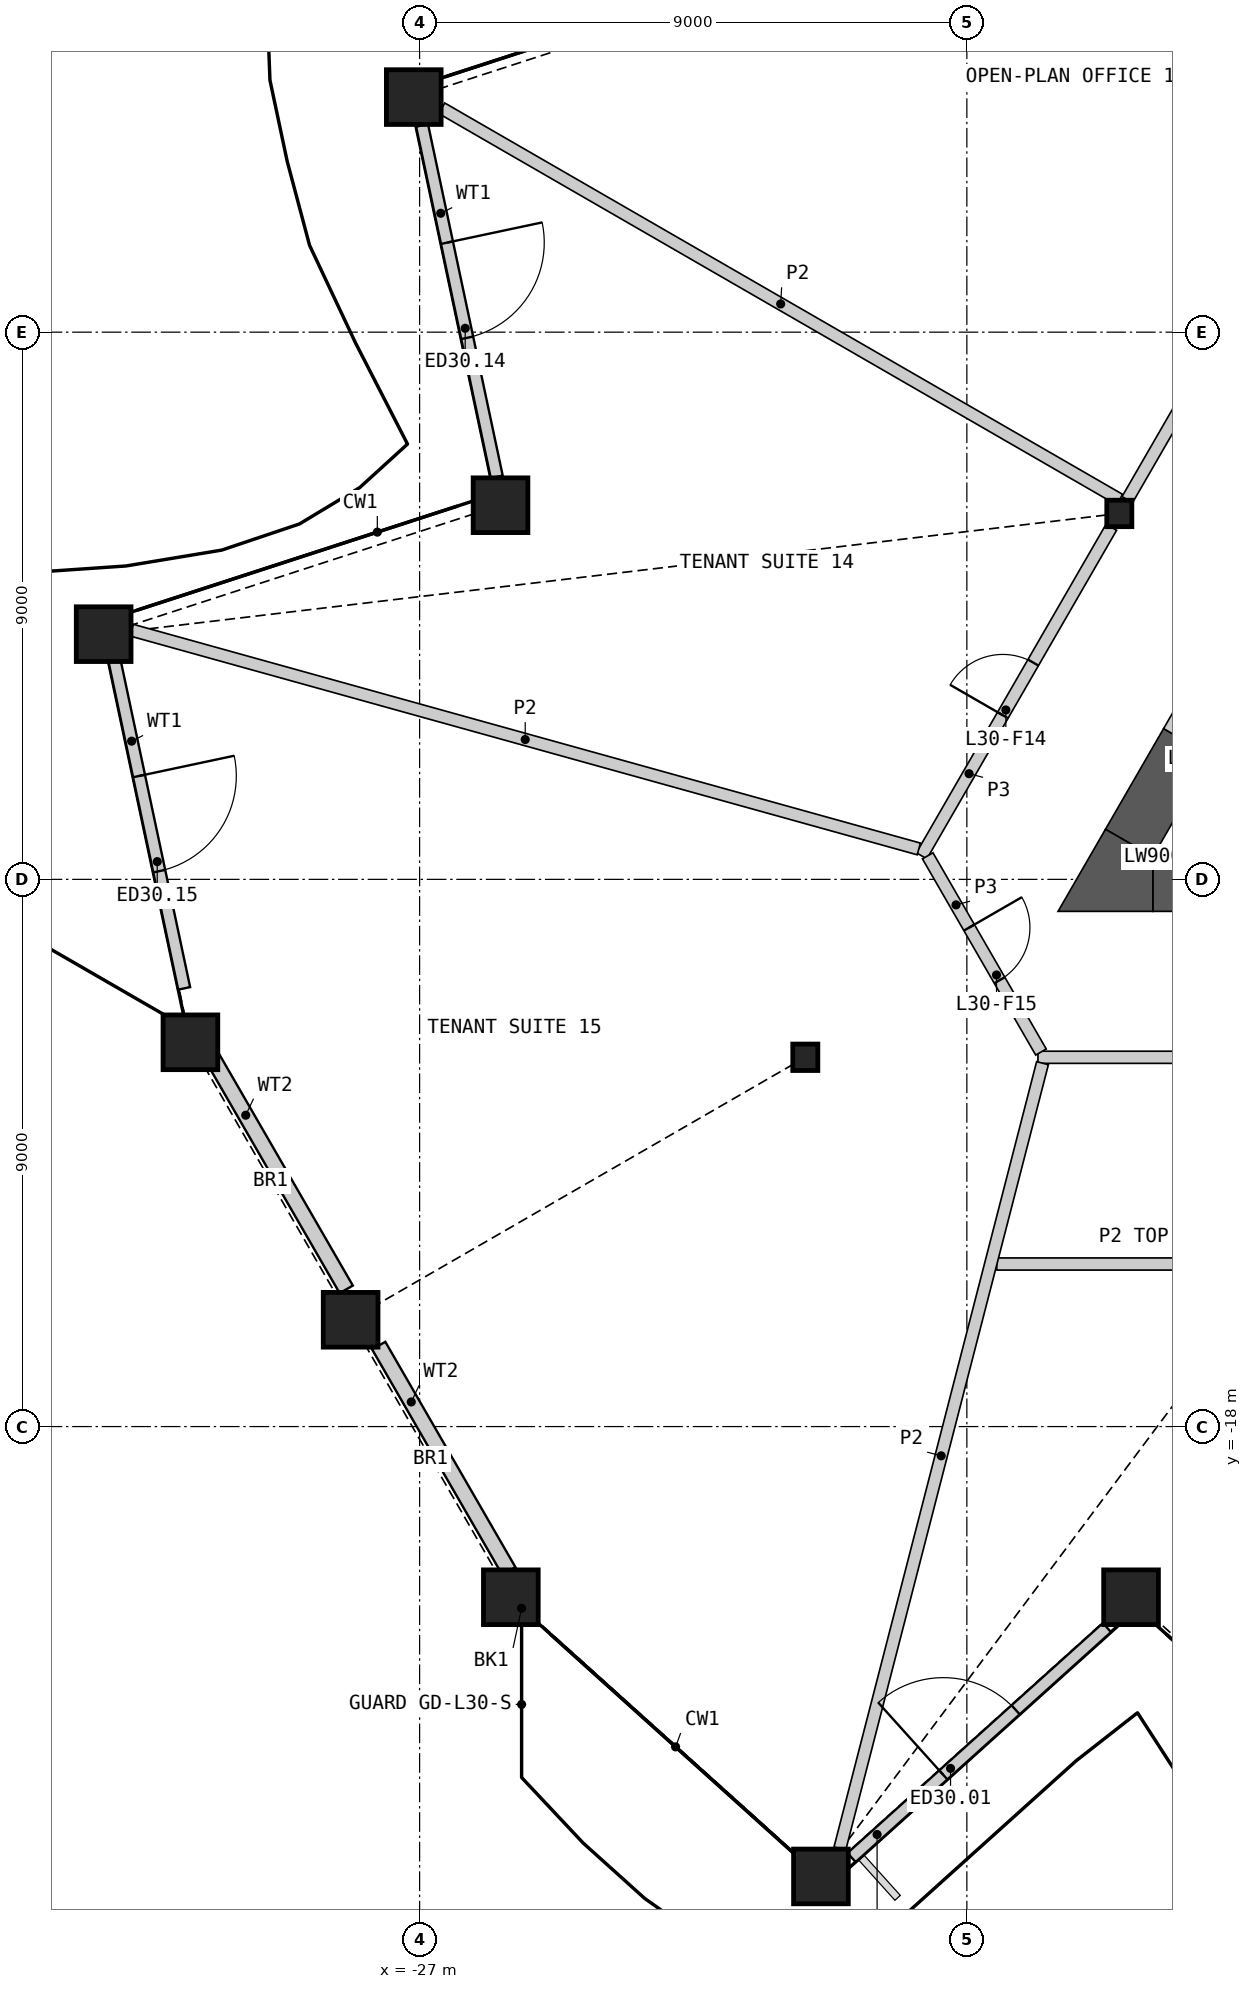
"""IFC4 building model, lengths in metres.
Left out: names, types, materials, properties, quantities, classifications, styles, units other than length and angle.
Written with IfcOpenShell. Run it as: python <this file> out.ifc"""

import sys

from ifc_helpers import new_model, si_unit, direction, frame, frame_2d, origin, origin_2d, place, context, subcontext, project, spatial, polyline, rectangle, hollow_rectangle, i_section, outline, extrude, element, fill, save


model = new_model("IFC4")
c1 = context("Model", 3, precision=1e-05, world=origin(), true_north=direction((0.0, 1.0)))
c2 = subcontext(c1, "Body", "Model", "MODEL_VIEW")
j1 = project(units=[si_unit("LENGTHUNIT", "METRE"), si_unit("PLANEANGLEUNIT", "RADIAN")], contexts=[c1])
p1 = place(None, origin())
s1 = spatial("IfcSite", under=j1, at=p1, CompositionType="ELEMENT")
p2 = place(p1, origin())
s2 = spatial("IfcBuilding", under=s1, at=p2, CompositionType="ELEMENT")
p3 = place(p2, frame((0.0, 0.0, 141.6)))
s3 = spatial("IfcBuildingStorey", under=s2, at=p3, CompositionType="ELEMENT", Elevation=141.6)
for number, where, z_axis, x_axis in (
    (1, (-25.5, -20.807, 0.0), (0.0, 0.0, 1.0), (1.0, 0.0, 0.0)),
    (2, (-20.4, -25.399, 0.0), (0.0, 0.0, 1.0), (1.0, 0.0, 0.0)),
    (3, (-15.3, -20.807, 0.0), (0.0, 0.0, 1.0), (1.0, 0.0, 0.0)),
    (4, (-27.096, 3.866, 0.0), (0.0, 0.0, 1.0), (1.0, 0.0, 0.0)),
    (5, (-25.669, -2.846, 0.0), (0.0, 0.0, 1.0), (1.0, 0.0, 0.0)),
    (6, (-32.196, -4.967, 0.0), (0.0, 0.0, 1.0), (1.0, 0.0, 0.0)),
    (7, (-30.769, -11.68, 0.0), (0.0, 0.0, 1.0), (1.0, 0.0, 0.0)),
    (8, (-28.135, -16.243, 0.0), (0.0, 0.0, 1.0), (1.0, 0.0, 0.0)),
):
    element("IfcColumn", number, at=place(p3, frame(where, z_axis=z_axis, x_axis=x_axis)), inside=s3, PredefinedType="COLUMN", context=c2, shape_type="SweptSolid", body=[
        extrude(hollow_rectangle(XDim=0.9, YDim=0.9, WallThickness=0.06, at=origin_2d()), origin(), (0.0, 0.0, 1.0), 4.2),
    ])
for number, where, z_axis, x_axis in (
    (9, (-15.493, -2.982, 0.0), (0.0, 0.0, 1.0), (1.0, 0.0, 0.0)),
    (10, (-20.657, -11.926, 0.0), (0.0, 0.0, 1.0), (1.0, 0.0, 0.0)),
):
    element("IfcColumn", number, at=place(p3, frame(where, z_axis=z_axis, x_axis=x_axis)), inside=s3, PredefinedType="COLUMN", context=c2, shape_type="SweptSolid", body=[
        extrude(i_section(OverallWidth=0.412, OverallDepth=0.435, WebThickness=0.036, FlangeThickness=0.057, at=origin_2d()), origin(), (0.0, 0.0, 1.0), 4.2),
    ])
p4 = place(p3, frame((-19.896, -25.088, 0.0), z_axis=(0.0, 0.0, 1.0), x_axis=(0.743158804828, 0.669115080391, 0.0)))
e11 = element("IfcWall", 11, at=p4, inside=s3, PredefinedType="SOLIDWALL", context=c2, shape_type="SweptSolid", body=[
    extrude(rectangle(XDim=5.651, YDim=0.2, at=frame_2d((2.826, 0.0))), origin(), (0.0, 0.0, 1.0), 3.189),
])
p5 = place(p4, frame((2.031, 0.0, 0.0)))
e12 = element("IfcOpeningElement", 12, at=p5, cuts=e11, PredefinedType="OPENING", context=c2, shape_type="SweptSolid", body=[
    extrude(rectangle(XDim=1.6, YDim=2.4, at=frame_2d((0.8, 1.2))), frame((0.0, 0.11, 0.0), z_axis=(0.0, -1.0, 0.0), x_axis=(1.0, 0.0, 0.0)), (0.0, 0.0, 1.0), 0.22),
])
p6 = place(p3, frame((-26.96, 3.401, 0.0), z_axis=(0.0, 0.0, 1.0), x_axis=(0.207883954519, -0.978153495855, 0.0)))
e13 = element("IfcWall", 13, at=p6, inside=s3, PredefinedType="SOLIDWALL", context=c2, shape_type="SweptSolid", body=[
    extrude(rectangle(XDim=5.91, YDim=0.2, at=frame_2d((2.955, 0.0))), origin(), (0.0, 0.0, 1.0), 3.189),
])
p7 = place(p6, frame((1.971, 0.0, 0.0)))
e14 = element("IfcOpeningElement", 14, at=p7, cuts=e13, PredefinedType="OPENING", context=c2, shape_type="SweptSolid", body=[
    extrude(rectangle(XDim=1.6, YDim=2.4, at=frame_2d((0.8, 1.2))), frame((0.0, 0.11, 0.0), z_axis=(0.0, -1.0, 0.0), x_axis=(1.0, 0.0, 0.0)), (0.0, 0.0, 1.0), 0.22),
])
p8 = place(p3, frame((-32.024, -5.371, 0.0), z_axis=(0.0, 0.0, 1.0), x_axis=(0.207934610169, -0.978142728795, 0.0)))
e15 = element("IfcWall", 15, at=p8, inside=s3, PredefinedType="SOLIDWALL", context=c2, shape_type="SweptSolid", body=[
    extrude(rectangle(XDim=5.543, YDim=0.2, at=frame_2d((2.771, 0.0))), origin(), (0.0, 0.0, 1.0), 3.189),
])
p9 = place(p8, frame((1.971, 0.0, 0.0)))
e16 = element("IfcOpeningElement", 16, at=p9, cuts=e15, PredefinedType="OPENING", context=c2, shape_type="SweptSolid", body=[
    extrude(rectangle(XDim=1.6, YDim=2.4, at=frame_2d((0.8, 1.2))), frame((0.0, 0.11, 0.0), z_axis=(0.0, -1.0, 0.0), x_axis=(1.0, 0.0, 0.0)), (0.0, 0.0, 1.0), 0.22),
])
p10 = place(p3, frame((-30.411, -11.924, 0.0), z_axis=(0.0, 0.0, 1.0), x_axis=(0.499979643272, -0.866037156428, 0.0)))
e17 = element("IfcWall", 17, at=p10, inside=s3, PredefinedType="SOLIDWALL", context=c2, shape_type="SweptSolid", body=[
    extrude(rectangle(XDim=4.41, YDim=0.25, at=frame_2d((2.205, 0.0))), origin(), (0.0, 0.0, 1.0), 3.189),
])
p11 = place(p3, frame((-27.672, -16.668, 0.0), z_axis=(0.0, 0.0, 1.0), x_axis=(0.500010506321, -0.866019337872, 0.0)))
e18 = element("IfcWall", 18, at=p11, inside=s3, PredefinedType="SOLIDWALL", context=c2, shape_type="SweptSolid", body=[
    extrude(rectangle(XDim=4.28, YDim=0.25, at=frame_2d((2.14, 0.0))), origin(), (0.0, 0.0, 1.0), 3.189),
])
p12 = place(p3, frame((-14.941, -9.076, 0.0), z_axis=(0.0, 0.0, 1.0), x_axis=(1.0, 0.0, 0.0)))
e19 = element("IfcWall", 19, at=p12, inside=s3, PredefinedType="SHEAR", context=c2, shape_type="SweptSolid", body=[
    extrude(rectangle(XDim=5.627, YDim=0.9, at=frame_2d((2.813, 0.0))), origin(), (0.0, 0.0, 1.0), 3.8),
])
p13 = place(p3, frame((-14.375, -6.745, 0.0), z_axis=(0.0, 0.0, 1.0), x_axis=(-0.499928740635, -0.866066541489, 0.0)))
e20 = element("IfcWall", 20, at=p13, inside=s3, PredefinedType="SHEAR", context=c2, shape_type="SweptSolid", body=[
    extrude(rectangle(XDim=1.912, YDim=0.9, at=frame_2d((0.956, 0.0))), origin(), (0.0, 0.0, 1.0), 3.8),
])
p14 = place(p3, origin())
e21 = element("IfcWall", 21, at=p14, inside=s3, PredefinedType="SHEAR", context=c2, shape_type="SweptSolid", body=[
    extrude(outline(polyline([(-14.941, -8.626), (-14.941, -9.526), (-16.5, -9.526), (-15.721, -8.176), (-14.941, -8.626)])), origin(), (0.0, 0.0, 1.0), 3.8),
])
p15 = place(p3, frame((-13.275, -4.84, 0.0), z_axis=(0.0, 0.0, 1.0), x_axis=(-0.50002983664, -0.866008176907, 0.0)))
e22 = element("IfcWall", 22, at=p15, inside=s3, PredefinedType="SHEAR", context=c2, shape_type="SweptSolid", body=[
    extrude(rectangle(XDim=2.2, YDim=0.9, at=frame_2d((1.1, 0.0))), origin(), (0.0, 0.0, 1.0), 3.8),
])
p16 = place(p15, frame((0.6, 0.0, 0.0)))
e23 = element("IfcOpeningElement", 23, at=p16, cuts=e22, PredefinedType="OPENING", context=c2, shape_type="SweptSolid", body=[
    extrude(rectangle(XDim=1.0, YDim=2.1, at=frame_2d((0.5, 1.05))), frame((0.0, 0.46, 0.0), z_axis=(0.0, -1.0, 0.0), x_axis=(1.0, 0.0, 0.0)), (0.0, 0.0, 1.0), 0.92),
])
p17 = place(p3, frame((-15.361, -2.754, 0.0), z_axis=(0.0, 0.0, 1.0), x_axis=(0.500004141693, 0.866023012564, 0.0)))
e24 = element("IfcWall", 24, at=p17, inside=s3, PredefinedType="PARTITIONING", context=c2, shape_type="SweptSolid", body=[
    extrude(rectangle(XDim=9.803, YDim=0.2, at=frame_2d((4.902, 0.0))), origin(), (0.0, 0.0, 1.0), 3.8),
])
p18 = place(p17, frame((4.452, 0.0, 0.0)))
e25 = element("IfcOpeningElement", 25, at=p18, cuts=e24, PredefinedType="OPENING", context=c2, shape_type="SweptSolid", body=[
    extrude(rectangle(XDim=1.0, YDim=2.1, at=frame_2d((0.5, 1.05))), frame((0.0, 0.11, 0.0), z_axis=(0.0, -1.0, 0.0), x_axis=(1.0, 0.0, 0.0)), (0.0, 0.0, 1.0), 0.22),
])
p19 = place(p3, frame((-16.831, -11.926, 0.0), z_axis=(0.0, 0.0, 1.0), x_axis=(1.0, 0.0, 0.0)))
e26 = element("IfcWall", 26, at=p19, inside=s3, PredefinedType="PARTITIONING", context=c2, shape_type="SweptSolid", body=[
    extrude(rectangle(XDim=6.275, YDim=0.2, at=frame_2d((3.137, 0.0))), origin(), (0.0, 0.0, 1.0), 3.8),
])
p20 = place(p3, frame((-18.744, -8.613, 0.0), z_axis=(0.0, 0.0, 1.0), x_axis=(0.499997920671, 0.866026604282, 0.0)))
e27 = element("IfcWall", 27, at=p20, inside=s3, PredefinedType="PARTITIONING", context=c2, shape_type="SweptSolid", body=[
    extrude(rectangle(XDim=6.24, YDim=0.2, at=frame_2d((3.12, 0.0))), origin(), (0.0, 0.0, 1.0), 3.8),
])
p21 = place(p20, frame((2.67, 0.0, 0.0)))
e28 = element("IfcOpeningElement", 28, at=p21, cuts=e27, PredefinedType="OPENING", context=c2, shape_type="SweptSolid", body=[
    extrude(rectangle(XDim=1.0, YDim=2.1, at=frame_2d((0.5, 1.05))), frame((0.0, 0.11, 0.0), z_axis=(0.0, -1.0, 0.0), x_axis=(1.0, 0.0, 0.0)), (0.0, 0.0, 1.0), 0.22),
])
p22 = place(p3, frame((-18.644, -8.613, 0.0), z_axis=(0.0, 0.0, 1.0), x_axis=(0.499958791762, -0.866049194065, 0.0)))
e29 = element("IfcWall", 29, at=p22, inside=s3, PredefinedType="PARTITIONING", context=c2, shape_type="SweptSolid", body=[
    extrude(rectangle(XDim=3.726, YDim=0.2, at=frame_2d((1.863, 0.0))), origin(), (0.0, 0.0, 1.0), 3.8),
])
p23 = place(p22, frame((1.363, 0.0, 0.0)))
e30 = element("IfcOpeningElement", 30, at=p23, cuts=e29, PredefinedType="OPENING", context=c2, shape_type="SweptSolid", body=[
    extrude(rectangle(XDim=1.0, YDim=2.1, at=frame_2d((0.5, 1.05))), frame((0.0, 0.11, 0.0), z_axis=(0.0, -1.0, 0.0), x_axis=(1.0, 0.0, 0.0)), (0.0, 0.0, 1.0), 0.22),
])
p24 = place(p3, frame((-17.508, -15.326, 0.0), z_axis=(0.0, 0.0, 1.0), x_axis=(1.0, 0.0, 0.0)))
e31 = element("IfcWall", 31, at=p24, inside=s3, PredefinedType="PARTITIONING", context=c2, shape_type="SweptSolid", body=[
    extrude(rectangle(XDim=17.408, YDim=0.2, at=frame_2d((8.704, 0.0))), origin(), (0.0, 0.0, 1.0), 2.885),
])
p25 = place(p24, frame((7.878, 0.0, 0.0)))
e32 = element("IfcOpeningElement", 32, at=p25, cuts=e31, PredefinedType="OPENING", context=c2, shape_type="SweptSolid", body=[
    extrude(rectangle(XDim=0.95, YDim=2.1, at=frame_2d((0.475, 1.05))), frame((0.0, 0.11, 0.0), z_axis=(0.0, -1.0, 0.0), x_axis=(1.0, 0.0, 0.0)), (0.0, 0.0, 1.0), 0.22),
])
p26 = place(p3, frame((-31.736, -4.901, 0.0), z_axis=(0.0, 0.0, 1.0), x_axis=(0.963468434011, -0.267821912219, 0.0)))
e33 = element("IfcWall", 33, at=p26, inside=s3, PredefinedType="PARTITIONING", context=c2, shape_type="SweptSolid", body=[
    extrude(rectangle(XDim=13.437, YDim=0.2, at=frame_2d((6.718, 0.0))), origin(), (0.0, 0.0, 1.0), 2.885),
])
p27 = place(p3, frame((-20.088, -24.939, 0.0), z_axis=(0.0, 0.0, 1.0), x_axis=(0.249815467428, 0.968293463901, 0.0)))
e34 = element("IfcWall", 34, at=p27, inside=s3, PredefinedType="PARTITIONING", context=c2, shape_type="SweptSolid", body=[
    extrude(rectangle(XDim=13.339, YDim=0.2, at=frame_2d((6.669, 0.0))), origin(), (0.0, 0.0, 1.0), 2.885),
])
p28 = place(p3, frame((-26.636, 3.682, 0.0), z_axis=(0.0, 0.0, 1.0), x_axis=(0.866026411352, -0.499998254837, 0.0)))
e35 = element("IfcWall", 35, at=p28, inside=s3, PredefinedType="PARTITIONING", context=c2, shape_type="SweptSolid", body=[
    extrude(rectangle(XDim=12.873, YDim=0.2, at=frame_2d((6.437, 0.0))), origin(), (0.0, 0.0, 1.0), 2.885),
])
p29 = place(p5, origin())
e36 = element("IfcDoor", 36, at=p29, inside=s3, OperationType="DOUBLE_DOOR_SINGLE_SWING", PredefinedType="DOOR", context=c2, shape_type="SweptSolid", body=[
    extrude(rectangle(XDim=1.6, YDim=2.4, at=frame_2d((0.8, 1.2))), frame((0.0, 0.025, 0.0), z_axis=(0.0, -1.0, 0.0), x_axis=(1.0, 0.0, 0.0)), (0.0, 0.0, 1.0), 0.05),
])
fill(e12, e36)
p30 = place(p7, origin())
e37 = element("IfcDoor", 37, at=p30, inside=s3, OperationType="DOUBLE_DOOR_SINGLE_SWING", PredefinedType="DOOR", context=c2, shape_type="SweptSolid", body=[
    extrude(rectangle(XDim=1.6, YDim=2.4, at=frame_2d((0.8, 1.2))), frame((0.0, 0.025, 0.0), z_axis=(0.0, -1.0, 0.0), x_axis=(1.0, 0.0, 0.0)), (0.0, 0.0, 1.0), 0.05),
])
fill(e14, e37)
p31 = place(p9, origin())
e38 = element("IfcDoor", 38, at=p31, inside=s3, OperationType="DOUBLE_DOOR_SINGLE_SWING", PredefinedType="DOOR", context=c2, shape_type="SweptSolid", body=[
    extrude(rectangle(XDim=1.6, YDim=2.4, at=frame_2d((0.8, 1.2))), frame((0.0, 0.025, 0.0), z_axis=(0.0, -1.0, 0.0), x_axis=(1.0, 0.0, 0.0)), (0.0, 0.0, 1.0), 0.05),
])
fill(e16, e38)
p32 = place(p21, origin())
e39 = element("IfcDoor", 39, at=p32, inside=s3, OperationType="SINGLE_SWING_LEFT", PredefinedType="DOOR", context=c2, shape_type="SweptSolid", body=[
    extrude(rectangle(XDim=1.0, YDim=2.1, at=frame_2d((0.5, 1.05))), frame((0.0, 0.025, 0.0), z_axis=(0.0, -1.0, 0.0), x_axis=(1.0, 0.0, 0.0)), (0.0, 0.0, 1.0), 0.05),
])
fill(e28, e39)
p33 = place(p23, origin())
e40 = element("IfcDoor", 40, at=p33, inside=s3, OperationType="SINGLE_SWING_LEFT", PredefinedType="DOOR", context=c2, shape_type="SweptSolid", body=[
    extrude(rectangle(XDim=1.0, YDim=2.1, at=frame_2d((0.5, 1.05))), frame((0.0, 0.025, 0.0), z_axis=(0.0, -1.0, 0.0), x_axis=(1.0, 0.0, 0.0)), (0.0, 0.0, 1.0), 0.05),
])
fill(e30, e40)
save(model, sys.argv[1])
